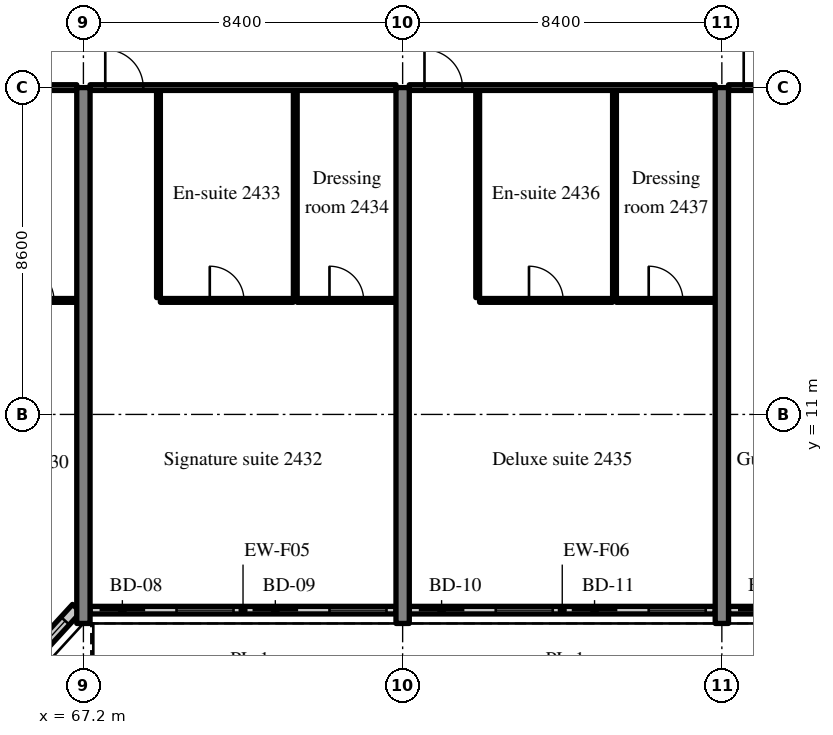
"""IFC4 building model, lengths in metres.
Left out: names, types, materials, properties, quantities, classifications, styles, units other than length and angle.
Written with IfcOpenShell. Run it as: python <this file> out.ifc"""

import sys

from ifc_helpers import new_model, si_unit, direction, frame, frame_2d, origin, place, context, subcontext, project, spatial, rectangle, extrude, source, transform, mapped, element, fill, save


model = new_model("IFC4")
c1 = context("Model", 3, precision=1e-05, world=origin(), true_north=direction((0.0, 1.0)))
c2 = subcontext(c1, "Body", "Model", "MODEL_VIEW")
j1 = project(units=[si_unit("LENGTHUNIT", "METRE"), si_unit("PLANEANGLEUNIT", "RADIAN")], contexts=[c1])
p1 = place(None, origin())
s1 = spatial("IfcSite", under=j1, at=p1, CompositionType="ELEMENT")
p2 = place(p1, origin())
s2 = spatial("IfcBuilding", under=s1, at=p2, CompositionType="ELEMENT")
p3 = place(p2, frame((0.0, 0.0, 102.8)))
s3 = spatial("IfcBuildingStorey", under=s2, at=p3, CompositionType="ELEMENT", Elevation=102.8)
m1 = source(origin(), c2, "Body", "SweptSolid", [
    extrude(rectangle(XDim=14.1, YDim=0.35, at=frame_2d((7.05, 0.0))), origin(), (0.0, 0.0, 1.0), 3.52),
])
for number, where, z_axis, x_axis in (
    (1, (67.2, 5.5, 0.0), (0.0, 0.0, 1.0), (0.0, 1.0, 0.0)),
    (2, (75.6, 5.5, 0.0), (0.0, 0.0, 1.0), (0.0, 1.0, 0.0)),
    (3, (84.0, 5.5, 0.0), (0.0, 0.0, 1.0), (0.0, 1.0, 0.0)),
):
    element("IfcWall", number, at=place(p3, frame(where, z_axis=z_axis, x_axis=x_axis)), inside=s3, PredefinedType="SHEAR", context=c2, shape_type="MappedRepresentation", body=[
        mapped(m1, transform((0.0, 0.0, 0.0), scale=1.0)),
    ])
m2 = source(origin(), c2, "Body", "SweptSolid", [
    extrude(rectangle(XDim=2.398, YDim=0.3, at=frame_2d((1.199, 0.0))), origin(), (0.0, 0.0, 1.0), 3.52),
])
p4 = place(p3, frame((65.404, 4.131, 0.0), z_axis=(0.0, 0.0, 1.0), x_axis=(0.675374189419, 0.737475222815, 0.0)))
e4 = element("IfcWall", 4, at=p4, inside=s3, PredefinedType="SOLIDWALL", context=c2, shape_type="MappedRepresentation", body=[
    mapped(m2, transform((0.0, 0.0, 0.0), scale=1.0)),
])
m3 = source(origin(), c2, "Body", "SweptSolid", [
    extrude(rectangle(XDim=1.5, YDim=2.0, at=frame_2d((0.75, 1.0))), frame((0.0, 0.16, 0.0), z_axis=(0.0, -1.0, 0.0), x_axis=(1.0, 0.0, 0.0)), (0.0, 0.0, 1.0), 0.32),
])
p5 = place(p4, frame((0.449, 0.0, 0.9)))
e5 = element("IfcOpeningElement", 5, at=p5, cuts=e4, PredefinedType="OPENING", context=c2, shape_type="MappedRepresentation", body=[
    mapped(m3, transform((0.0, 0.0, 0.0), scale=1.0)),
])
m4 = source(origin(), c2, "Body", "SweptSolid", [
    extrude(rectangle(XDim=8.05, YDim=0.2, at=frame_2d((4.025, 0.0))), origin(), (0.0, 0.0, 1.0), 2.82),
])
p6 = place(p3, frame((67.375, 5.85, 0.0), z_axis=(0.0, 0.0, 1.0), x_axis=(1.0, 0.0, 0.0)))
e6 = element("IfcWall", 6, at=p6, inside=s3, PredefinedType="SOLIDWALL", context=c2, shape_type="MappedRepresentation", body=[
    mapped(m4, transform((0.0, 0.0, 0.0), scale=1.0)),
])
m5 = source(origin(), c2, "Body", "SweptSolid", [
    extrude(rectangle(XDim=1.2, YDim=2.4, at=frame_2d((0.6, 1.2))), frame((0.0, 0.11, 0.0), z_axis=(0.0, -1.0, 0.0), x_axis=(1.0, 0.0, 0.0)), (0.0, 0.0, 1.0), 0.22),
])
p7 = place(p6, frame((0.25, 0.0, 0.0)))
e7 = element("IfcOpeningElement", 7, at=p7, cuts=e6, PredefinedType="OPENING", context=c2, shape_type="MappedRepresentation", body=[
    mapped(m5, transform((0.0, 0.0, 0.0), scale=1.0)),
])
m6 = source(origin(), c2, "Body", "SweptSolid", [
    extrude(rectangle(XDim=1.5, YDim=1.5, at=frame_2d((0.75, 0.75))), frame((0.0, 0.11, 0.0), z_axis=(0.0, -1.0, 0.0), x_axis=(1.0, 0.0, 0.0)), (0.0, 0.0, 1.0), 0.22),
])
p8 = place(p6, frame((2.275, 0.0, 0.9)))
e8 = element("IfcOpeningElement", 8, at=p8, cuts=e6, PredefinedType="OPENING", context=c2, shape_type="MappedRepresentation", body=[
    mapped(m6, transform((0.0, 0.0, 0.0), scale=1.0)),
])
p9 = place(p6, frame((4.275, 0.0, 0.0)))
e9 = element("IfcOpeningElement", 9, at=p9, cuts=e6, PredefinedType="OPENING", context=c2, shape_type="MappedRepresentation", body=[
    mapped(m5, transform((0.0, 0.0, 0.0), scale=1.0)),
])
p10 = place(p6, frame((6.3, 0.0, 0.9)))
e10 = element("IfcOpeningElement", 10, at=p10, cuts=e6, PredefinedType="OPENING", context=c2, shape_type="MappedRepresentation", body=[
    mapped(m6, transform((0.0, 0.0, 0.0), scale=1.0)),
])
p11 = place(p3, frame((75.775, 5.85, 0.0), z_axis=(0.0, 0.0, 1.0), x_axis=(1.0, 0.0, 0.0)))
e11 = element("IfcWall", 11, at=p11, inside=s3, PredefinedType="SOLIDWALL", context=c2, shape_type="MappedRepresentation", body=[
    mapped(m4, transform((0.0, 0.0, 0.0), scale=1.0)),
])
p12 = place(p11, frame((0.25, 0.0, 0.0)))
e12 = element("IfcOpeningElement", 12, at=p12, cuts=e11, PredefinedType="OPENING", context=c2, shape_type="MappedRepresentation", body=[
    mapped(m5, transform((0.0, 0.0, 0.0), scale=1.0)),
])
p13 = place(p11, frame((2.275, 0.0, 0.9)))
e13 = element("IfcOpeningElement", 13, at=p13, cuts=e11, PredefinedType="OPENING", context=c2, shape_type="MappedRepresentation", body=[
    mapped(m6, transform((0.0, 0.0, 0.0), scale=1.0)),
])
p14 = place(p11, frame((4.275, 0.0, 0.0)))
e14 = element("IfcOpeningElement", 14, at=p14, cuts=e11, PredefinedType="OPENING", context=c2, shape_type="MappedRepresentation", body=[
    mapped(m5, transform((0.0, 0.0, 0.0), scale=1.0)),
])
p15 = place(p11, frame((6.3, 0.0, 0.9)))
e15 = element("IfcOpeningElement", 15, at=p15, cuts=e11, PredefinedType="OPENING", context=c2, shape_type="MappedRepresentation", body=[
    mapped(m6, transform((0.0, 0.0, 0.0), scale=1.0)),
])
p16 = place(p3, frame((84.175, 5.85, 0.0), z_axis=(0.0, 0.0, 1.0), x_axis=(1.0, 0.0, 0.0)))
e16 = element("IfcWall", 16, at=p16, inside=s3, PredefinedType="SOLIDWALL", context=c2, shape_type="MappedRepresentation", body=[
    mapped(m4, transform((0.0, 0.0, 0.0), scale=1.0)),
])
p17 = place(p16, frame((0.25, 0.0, 0.0)))
e17 = element("IfcOpeningElement", 17, at=p17, cuts=e16, PredefinedType="OPENING", context=c2, shape_type="MappedRepresentation", body=[
    mapped(m5, transform((0.0, 0.0, 0.0), scale=1.0)),
])
p18 = place(p16, frame((2.275, 0.0, 0.9)))
e18 = element("IfcOpeningElement", 18, at=p18, cuts=e16, PredefinedType="OPENING", context=c2, shape_type="MappedRepresentation", body=[
    mapped(m6, transform((0.0, 0.0, 0.0), scale=1.0)),
])
p19 = place(p16, frame((4.275, 0.0, 0.0)))
e19 = element("IfcOpeningElement", 19, at=p19, cuts=e16, PredefinedType="OPENING", context=c2, shape_type="MappedRepresentation", body=[
    mapped(m5, transform((0.0, 0.0, 0.0), scale=1.0)),
])
p20 = place(p16, frame((6.3, 0.0, 0.9)))
e20 = element("IfcOpeningElement", 20, at=p20, cuts=e16, PredefinedType="OPENING", context=c2, shape_type="MappedRepresentation", body=[
    mapped(m6, transform((0.0, 0.0, 0.0), scale=1.0)),
])
m7 = source(origin(), c2, "Body", "SweptSolid", [
    extrude(rectangle(XDim=2.1, YDim=0.1, at=frame_2d((1.05, 0.0))), origin(), (0.0, 0.0, 1.0), 3.52),
])
p21 = place(p3, frame((64.925, 14.0, 0.0), z_axis=(0.0, 0.0, 1.0), x_axis=(1.0, 0.0, 0.0)))
e21 = element("IfcWall", 21, at=p21, inside=s3, PredefinedType="PARTITIONING", context=c2, shape_type="MappedRepresentation", body=[
    mapped(m7, transform((0.0, 0.0, 0.0), scale=1.0)),
])
m8 = source(origin(), c2, "Body", "SweptSolid", [
    extrude(rectangle(XDim=0.9, YDim=2.1, at=frame_2d((0.45, 1.05))), frame((0.0, 0.06, 0.0), z_axis=(0.0, -1.0, 0.0), x_axis=(1.0, 0.0, 0.0)), (0.0, 0.0, 1.0), 0.12),
])
p22 = place(p21, frame((0.6, 0.0, 0.0)))
e22 = element("IfcOpeningElement", 22, at=p22, cuts=e21, PredefinedType="OPENING", context=c2, shape_type="MappedRepresentation", body=[
    mapped(m8, transform((0.0, 0.0, 0.0), scale=1.0)),
])
m9 = source(origin(), c2, "Body", "SweptSolid", [
    extrude(rectangle(XDim=3.95, YDim=0.15, at=frame_2d((1.975, 0.0))), origin(), (0.0, 0.0, 1.0), 2.82),
])
p23 = place(p3, frame((63.075, 19.6, 0.0), z_axis=(0.0, 0.0, 1.0), x_axis=(1.0, 0.0, 0.0)))
e23 = element("IfcWall", 23, at=p23, inside=s3, PredefinedType="PARTITIONING", context=c2, shape_type="MappedRepresentation", body=[
    mapped(m9, transform((0.0, 0.0, 0.0), scale=1.0)),
])
m10 = source(origin(), c2, "Body", "SweptSolid", [
    extrude(rectangle(XDim=1.0, YDim=2.1, at=frame_2d((0.5, 1.05))), frame((0.0, 0.085, 0.0), z_axis=(0.0, -1.0, 0.0), x_axis=(1.0, 0.0, 0.0)), (0.0, 0.0, 1.0), 0.17),
])
p24 = place(p23, frame((0.4, 0.0, 0.0)))
e24 = element("IfcOpeningElement", 24, at=p24, cuts=e23, PredefinedType="OPENING", context=c2, shape_type="MappedRepresentation", body=[
    mapped(m10, transform((0.0, 0.0, 0.0), scale=1.0)),
])
m11 = source(origin(), c2, "Body", "SweptSolid", [
    extrude(rectangle(XDim=5.45, YDim=0.1, at=frame_2d((2.725, 0.0))), origin(), (0.0, 0.0, 1.0), 3.52),
])
for number, where, z_axis, x_axis in (
    (25, (69.175, 14.075, 0.0), (0.0, 0.0, 1.0), (0.0, 1.0, 0.0)),
    (26, (72.775, 14.075, 0.0), (0.0, 0.0, 1.0), (0.0, 1.0, 0.0)),
):
    element("IfcWall", number, at=place(p3, frame(where, z_axis=z_axis, x_axis=x_axis)), inside=s3, PredefinedType="PARTITIONING", context=c2, shape_type="MappedRepresentation", body=[
        mapped(m11, transform((0.0, 0.0, 0.0), scale=1.0)),
    ])
m12 = source(origin(), c2, "Body", "SweptSolid", [
    extrude(rectangle(XDim=3.5, YDim=0.1, at=frame_2d((1.75, 0.0))), origin(), (0.0, 0.0, 1.0), 3.52),
])
p25 = place(p3, frame((69.225, 14.0, 0.0), z_axis=(0.0, 0.0, 1.0), x_axis=(1.0, 0.0, 0.0)))
e27 = element("IfcWall", 27, at=p25, inside=s3, PredefinedType="PARTITIONING", context=c2, shape_type="MappedRepresentation", body=[
    mapped(m12, transform((0.0, 0.0, 0.0), scale=1.0)),
])
p26 = place(p25, frame((1.3, 0.0, 0.0)))
e28 = element("IfcOpeningElement", 28, at=p26, cuts=e27, PredefinedType="OPENING", context=c2, shape_type="MappedRepresentation", body=[
    mapped(m8, transform((0.0, 0.0, 0.0), scale=1.0)),
])
m13 = source(origin(), c2, "Body", "SweptSolid", [
    extrude(rectangle(XDim=2.6, YDim=0.1, at=frame_2d((1.3, 0.0))), origin(), (0.0, 0.0, 1.0), 3.52),
])
p27 = place(p3, frame((72.825, 14.0, 0.0), z_axis=(0.0, 0.0, 1.0), x_axis=(1.0, 0.0, 0.0)))
e29 = element("IfcWall", 29, at=p27, inside=s3, PredefinedType="PARTITIONING", context=c2, shape_type="MappedRepresentation", body=[
    mapped(m13, transform((0.0, 0.0, 0.0), scale=1.0)),
])
p28 = place(p27, frame((0.85, 0.0, 0.0)))
e30 = element("IfcOpeningElement", 30, at=p28, cuts=e29, PredefinedType="OPENING", context=c2, shape_type="MappedRepresentation", body=[
    mapped(m8, transform((0.0, 0.0, 0.0), scale=1.0)),
])
m14 = source(origin(), c2, "Body", "SweptSolid", [
    extrude(rectangle(XDim=8.05, YDim=0.15, at=frame_2d((4.025, 0.0))), origin(), (0.0, 0.0, 1.0), 2.82),
])
p29 = place(p3, frame((67.375, 19.6, 0.0), z_axis=(0.0, 0.0, 1.0), x_axis=(1.0, 0.0, 0.0)))
e31 = element("IfcWall", 31, at=p29, inside=s3, PredefinedType="PARTITIONING", context=c2, shape_type="MappedRepresentation", body=[
    mapped(m14, transform((0.0, 0.0, 0.0), scale=1.0)),
])
p30 = place(p29, frame((0.4, 0.0, 0.0)))
e32 = element("IfcOpeningElement", 32, at=p30, cuts=e31, PredefinedType="OPENING", context=c2, shape_type="MappedRepresentation", body=[
    mapped(m10, transform((0.0, 0.0, 0.0), scale=1.0)),
])
for number, where, z_axis, x_axis in (
    (33, (77.575, 14.075, 0.0), (0.0, 0.0, 1.0), (0.0, 1.0, 0.0)),
    (34, (81.175, 14.075, 0.0), (0.0, 0.0, 1.0), (0.0, 1.0, 0.0)),
):
    element("IfcWall", number, at=place(p3, frame(where, z_axis=z_axis, x_axis=x_axis)), inside=s3, PredefinedType="PARTITIONING", context=c2, shape_type="MappedRepresentation", body=[
        mapped(m11, transform((0.0, 0.0, 0.0), scale=1.0)),
    ])
p31 = place(p3, frame((77.625, 14.0, 0.0), z_axis=(0.0, 0.0, 1.0), x_axis=(1.0, 0.0, 0.0)))
e35 = element("IfcWall", 35, at=p31, inside=s3, PredefinedType="PARTITIONING", context=c2, shape_type="MappedRepresentation", body=[
    mapped(m12, transform((0.0, 0.0, 0.0), scale=1.0)),
])
p32 = place(p31, frame((1.3, 0.0, 0.0)))
e36 = element("IfcOpeningElement", 36, at=p32, cuts=e35, PredefinedType="OPENING", context=c2, shape_type="MappedRepresentation", body=[
    mapped(m8, transform((0.0, 0.0, 0.0), scale=1.0)),
])
m15 = source(origin(), c2, "Body", "SweptSolid", [
    extrude(rectangle(XDim=2.6, YDim=0.1, at=frame_2d((1.3, 0.0))), origin(), (0.0, 0.0, 1.0), 3.52),
])
p33 = place(p3, frame((81.225, 14.0, 0.0), z_axis=(0.0, 0.0, 1.0), x_axis=(1.0, 0.0, 0.0)))
e37 = element("IfcWall", 37, at=p33, inside=s3, PredefinedType="PARTITIONING", context=c2, shape_type="MappedRepresentation", body=[
    mapped(m15, transform((0.0, 0.0, 0.0), scale=1.0)),
])
p34 = place(p33, frame((0.85, 0.0, 0.0)))
e38 = element("IfcOpeningElement", 38, at=p34, cuts=e37, PredefinedType="OPENING", context=c2, shape_type="MappedRepresentation", body=[
    mapped(m8, transform((0.0, 0.0, 0.0), scale=1.0)),
])
p35 = place(p3, frame((75.775, 19.6, 0.0), z_axis=(0.0, 0.0, 1.0), x_axis=(1.0, 0.0, 0.0)))
e39 = element("IfcWall", 39, at=p35, inside=s3, PredefinedType="PARTITIONING", context=c2, shape_type="MappedRepresentation", body=[
    mapped(m14, transform((0.0, 0.0, 0.0), scale=1.0)),
])
p36 = place(p35, frame((0.4, 0.0, 0.0)))
e40 = element("IfcOpeningElement", 40, at=p36, cuts=e39, PredefinedType="OPENING", context=c2, shape_type="MappedRepresentation", body=[
    mapped(m10, transform((0.0, 0.0, 0.0), scale=1.0)),
])
p37 = place(p3, frame((84.175, 19.6, 0.0), z_axis=(0.0, 0.0, 1.0), x_axis=(1.0, 0.0, 0.0)))
e41 = element("IfcWall", 41, at=p37, inside=s3, PredefinedType="PARTITIONING", context=c2, shape_type="MappedRepresentation", body=[
    mapped(m9, transform((0.0, 0.0, 0.0), scale=1.0)),
])
p38 = place(p37, frame((0.4, 0.0, 0.0)))
e42 = element("IfcOpeningElement", 42, at=p38, cuts=e41, PredefinedType="OPENING", context=c2, shape_type="MappedRepresentation", body=[
    mapped(m10, transform((0.0, 0.0, 0.0), scale=1.0)),
])
m16 = source(origin(), c2, "Body", "SweptSolid", [
    extrude(rectangle(XDim=1.5, YDim=2.0, at=frame_2d((0.75, 1.0))), frame((0.0, 0.03, 0.0), z_axis=(0.0, -1.0, 0.0), x_axis=(1.0, 0.0, 0.0)), (0.0, 0.0, 1.0), 0.06),
])
p39 = place(p5, origin())
e43 = element("IfcWindow", 43, at=p39, inside=s3, PartitioningType="SINGLE_PANEL", PredefinedType="WINDOW", context=c2, shape_type="MappedRepresentation", body=[
    mapped(m16, transform((0.0, 0.0, 0.0), scale=1.0)),
])
fill(e5, e43)
m17 = source(origin(), c2, "Body", "SweptSolid", [
    extrude(rectangle(XDim=1.2, YDim=2.4, at=frame_2d((0.6, 1.2))), frame((0.0, 0.025, 0.0), z_axis=(0.0, -1.0, 0.0), x_axis=(1.0, 0.0, 0.0)), (0.0, 0.0, 1.0), 0.05),
])
p40 = place(p7, origin())
e44 = element("IfcDoor", 44, at=p40, inside=s3, OperationType="SLIDING_TO_RIGHT", PredefinedType="DOOR", context=c2, shape_type="MappedRepresentation", body=[
    mapped(m17, transform((0.0, 0.0, 0.0), scale=1.0)),
])
fill(e7, e44)
m18 = source(origin(), c2, "Body", "SweptSolid", [
    extrude(rectangle(XDim=1.5, YDim=1.5, at=frame_2d((0.75, 0.75))), frame((0.0, 0.03, 0.0), z_axis=(0.0, -1.0, 0.0), x_axis=(1.0, 0.0, 0.0)), (0.0, 0.0, 1.0), 0.06),
])
p41 = place(p8, origin())
e45 = element("IfcWindow", 45, at=p41, inside=s3, PartitioningType="SINGLE_PANEL", PredefinedType="WINDOW", context=c2, shape_type="MappedRepresentation", body=[
    mapped(m18, transform((0.0, 0.0, 0.0), scale=1.0)),
])
fill(e8, e45)
p42 = place(p9, origin())
e46 = element("IfcDoor", 46, at=p42, inside=s3, OperationType="SLIDING_TO_LEFT", PredefinedType="DOOR", context=c2, shape_type="MappedRepresentation", body=[
    mapped(m17, transform((0.0, 0.0, 0.0), scale=1.0)),
])
fill(e9, e46)
p43 = place(p10, origin())
e47 = element("IfcWindow", 47, at=p43, inside=s3, PartitioningType="SINGLE_PANEL", PredefinedType="WINDOW", context=c2, shape_type="MappedRepresentation", body=[
    mapped(m18, transform((0.0, 0.0, 0.0), scale=1.0)),
])
fill(e10, e47)
p44 = place(p12, origin())
e48 = element("IfcDoor", 48, at=p44, inside=s3, OperationType="SLIDING_TO_RIGHT", PredefinedType="DOOR", context=c2, shape_type="MappedRepresentation", body=[
    mapped(m17, transform((0.0, 0.0, 0.0), scale=1.0)),
])
fill(e12, e48)
p45 = place(p13, origin())
e49 = element("IfcWindow", 49, at=p45, inside=s3, PartitioningType="SINGLE_PANEL", PredefinedType="WINDOW", context=c2, shape_type="MappedRepresentation", body=[
    mapped(m18, transform((0.0, 0.0, 0.0), scale=1.0)),
])
fill(e13, e49)
p46 = place(p14, origin())
e50 = element("IfcDoor", 50, at=p46, inside=s3, OperationType="SLIDING_TO_LEFT", PredefinedType="DOOR", context=c2, shape_type="MappedRepresentation", body=[
    mapped(m17, transform((0.0, 0.0, 0.0), scale=1.0)),
])
fill(e14, e50)
p47 = place(p15, origin())
e51 = element("IfcWindow", 51, at=p47, inside=s3, PartitioningType="SINGLE_PANEL", PredefinedType="WINDOW", context=c2, shape_type="MappedRepresentation", body=[
    mapped(m18, transform((0.0, 0.0, 0.0), scale=1.0)),
])
fill(e15, e51)
p48 = place(p17, origin())
e52 = element("IfcDoor", 52, at=p48, inside=s3, OperationType="SLIDING_TO_RIGHT", PredefinedType="DOOR", context=c2, shape_type="MappedRepresentation", body=[
    mapped(m17, transform((0.0, 0.0, 0.0), scale=1.0)),
])
fill(e17, e52)
m19 = source(origin(), c2, "Body", "SweptSolid", [
    extrude(rectangle(XDim=0.9, YDim=2.1, at=frame_2d((0.45, 1.05))), frame((0.0, 0.025, 0.0), z_axis=(0.0, -1.0, 0.0), x_axis=(1.0, 0.0, 0.0)), (0.0, 0.0, 1.0), 0.05),
])
p49 = place(p22, origin())
e53 = element("IfcDoor", 53, at=p49, inside=s3, OperationType="SINGLE_SWING_LEFT", PredefinedType="DOOR", context=c2, shape_type="MappedRepresentation", body=[
    mapped(m19, transform((0.0, 0.0, 0.0), scale=1.0)),
])
fill(e22, e53)
p50 = place(p26, origin())
e54 = element("IfcDoor", 54, at=p50, inside=s3, OperationType="SINGLE_SWING_LEFT", PredefinedType="DOOR", context=c2, shape_type="MappedRepresentation", body=[
    mapped(m19, transform((0.0, 0.0, 0.0), scale=1.0)),
])
fill(e28, e54)
p51 = place(p28, origin())
e55 = element("IfcDoor", 55, at=p51, inside=s3, OperationType="SINGLE_SWING_LEFT", PredefinedType="DOOR", context=c2, shape_type="MappedRepresentation", body=[
    mapped(m19, transform((0.0, 0.0, 0.0), scale=1.0)),
])
fill(e30, e55)
m20 = source(origin(), c2, "Body", "SweptSolid", [
    extrude(rectangle(XDim=1.0, YDim=2.1, at=frame_2d((0.5, 1.05))), frame((0.0, 0.025, 0.0), z_axis=(0.0, -1.0, 0.0), x_axis=(1.0, 0.0, 0.0)), (0.0, 0.0, 1.0), 0.05),
])
p52 = place(p30, origin())
e56 = element("IfcDoor", 56, at=p52, inside=s3, OperationType="SINGLE_SWING_LEFT", PredefinedType="DOOR", context=c2, shape_type="MappedRepresentation", body=[
    mapped(m20, transform((0.0, 0.0, 0.0), scale=1.0)),
])
fill(e32, e56)
p53 = place(p32, origin())
e57 = element("IfcDoor", 57, at=p53, inside=s3, OperationType="SINGLE_SWING_LEFT", PredefinedType="DOOR", context=c2, shape_type="MappedRepresentation", body=[
    mapped(m19, transform((0.0, 0.0, 0.0), scale=1.0)),
])
fill(e36, e57)
p54 = place(p34, origin())
e58 = element("IfcDoor", 58, at=p54, inside=s3, OperationType="SINGLE_SWING_LEFT", PredefinedType="DOOR", context=c2, shape_type="MappedRepresentation", body=[
    mapped(m19, transform((0.0, 0.0, 0.0), scale=1.0)),
])
fill(e38, e58)
p55 = place(p36, origin())
e59 = element("IfcDoor", 59, at=p55, inside=s3, OperationType="SINGLE_SWING_LEFT", PredefinedType="DOOR", context=c2, shape_type="MappedRepresentation", body=[
    mapped(m20, transform((0.0, 0.0, 0.0), scale=1.0)),
])
fill(e40, e59)
p56 = place(p38, origin())
e60 = element("IfcDoor", 60, at=p56, inside=s3, OperationType="SINGLE_SWING_LEFT", PredefinedType="DOOR", context=c2, shape_type="MappedRepresentation", body=[
    mapped(m20, transform((0.0, 0.0, 0.0), scale=1.0)),
])
fill(e42, e60)
save(model, sys.argv[1])
